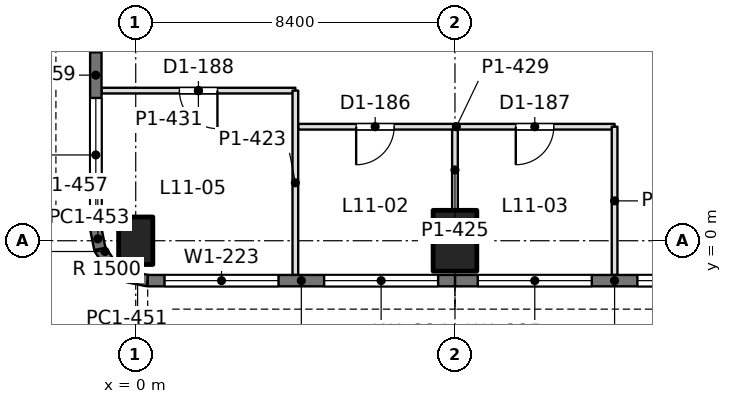
"""IFC4 building model, lengths in metres.
Left out: names, types, materials, properties, quantities, classifications, styles, units other than length and angle.
Written with IfcOpenShell. Run it as: python <this file> out.ifc"""

import sys

from ifc_helpers import new_model, si_unit, direction, frame, frame_2d, origin, origin_with_axes, origin_2d, place, context, subcontext, project, spatial, rectangle, extrude, element, fill, save


model = new_model("IFC4")
c1 = context("Model", 3, precision=1e-05, world=origin(), true_north=direction((0.0, 1.0)))
c2 = subcontext(c1, "Body", "Model", "MODEL_VIEW")
j1 = project(units=[si_unit("LENGTHUNIT", "METRE"), si_unit("PLANEANGLEUNIT", "RADIAN")], contexts=[c1])
p1 = place(None, origin())
s1 = spatial("IfcSite", under=j1, at=p1, CompositionType="ELEMENT")
p2 = place(p1, origin())
s2 = spatial("IfcBuilding", under=s1, at=p2, CompositionType="ELEMENT")
p3 = place(p2, frame((0.0, 0.0, 50.4)))
s3 = spatial("IfcBuildingStorey", under=s2, at=p3, CompositionType="ELEMENT", Elevation=50.4)
p4 = place(p3, origin_with_axes())
e1 = element("IfcColumn", 1, at=p4, inside=s3, PredefinedType="COLUMN", context=c2, shape_type="SweptSolid", body=[
    extrude(rectangle(XDim=0.9, YDim=1.25, at=origin_2d()), origin(), (0.0, 0.0, 1.0), 4.5),
])
p5 = place(p3, frame((8.4, 0.0, 0.0), z_axis=(0.0, 0.0, 1.0), x_axis=(1.0, 0.0, 0.0)))
e2 = element("IfcColumn", 2, at=p5, inside=s3, PredefinedType="COLUMN", context=c2, shape_type="SweptSolid", body=[
    extrude(rectangle(XDim=1.15, YDim=1.6, at=origin_2d()), origin(), (0.0, 0.0, 1.0), 4.5),
])
p6 = place(p3, frame((16.8, -1.05, 0.0), z_axis=(0.0, 0.0, 1.0), x_axis=(-1.0, 0.0, 0.0)))
e3 = element("IfcWall", 3, at=p6, inside=s3, PredefinedType="SOLIDWALL", context=c2, shape_type="SweptSolid", body=[
    extrude(rectangle(XDim=8.4, YDim=0.3, at=frame_2d((4.2, 0.0))), origin(), (0.0, 0.0, 1.0), 4.34),
])
p7 = place(p6, frame((0.6, 0.0, 0.9)))
e4 = element("IfcOpeningElement", 4, at=p7, cuts=e3, PredefinedType="OPENING", context=c2, shape_type="SweptSolid", body=[
    extrude(rectangle(XDim=3.0, YDim=1.9, at=frame_2d((1.5, 0.95))), frame((0.0, 0.16, 0.0), z_axis=(0.0, -1.0, 0.0), x_axis=(1.0, 0.0, 0.0)), (0.0, 0.0, 1.0), 0.32),
])
p8 = place(p6, frame((4.8, 0.0, 0.9)))
e5 = element("IfcOpeningElement", 5, at=p8, cuts=e3, PredefinedType="OPENING", context=c2, shape_type="SweptSolid", body=[
    extrude(rectangle(XDim=3.0, YDim=1.9, at=frame_2d((1.5, 0.95))), frame((0.0, 0.16, 0.0), z_axis=(0.0, -1.0, 0.0), x_axis=(1.0, 0.0, 0.0)), (0.0, 0.0, 1.0), 0.32),
])
p9 = place(p3, frame((8.4, -1.05, 0.0), z_axis=(0.0, 0.0, 1.0), x_axis=(-1.0, 0.0, 0.0)))
e6 = element("IfcWall", 6, at=p9, inside=s3, PredefinedType="SOLIDWALL", context=c2, shape_type="SweptSolid", body=[
    extrude(rectangle(XDim=8.085, YDim=0.3, at=frame_2d((4.042, 0.0))), origin(), (0.0, 0.0, 1.0), 4.34),
])
p10 = place(p9, frame((0.443, 0.0, 0.9)))
e7 = element("IfcOpeningElement", 7, at=p10, cuts=e6, PredefinedType="OPENING", context=c2, shape_type="SweptSolid", body=[
    extrude(rectangle(XDim=3.0, YDim=1.9, at=frame_2d((1.5, 0.95))), frame((0.0, 0.16, 0.0), z_axis=(0.0, -1.0, 0.0), x_axis=(1.0, 0.0, 0.0)), (0.0, 0.0, 1.0), 0.32),
])
p11 = place(p9, frame((4.643, 0.0, 0.9)))
e8 = element("IfcOpeningElement", 8, at=p11, cuts=e6, PredefinedType="OPENING", context=c2, shape_type="SweptSolid", body=[
    extrude(rectangle(XDim=3.0, YDim=1.9, at=frame_2d((1.5, 0.95))), frame((0.0, 0.16, 0.0), z_axis=(0.0, -1.0, 0.0), x_axis=(1.0, 0.0, 0.0)), (0.0, 0.0, 1.0), 0.32),
])
p12 = place(p3, frame((0.315, -1.05, 0.0), z_axis=(0.0, 0.0, 1.0), x_axis=(-0.980788534345, 0.195073962632, 0.0)))
e9 = element("IfcWall", 9, at=p12, inside=s3, PredefinedType="SOLIDWALL", context=c2, shape_type="SweptSolid", body=[
    extrude(rectangle(XDim=0.541, YDim=0.3, at=frame_2d((0.271, 0.0))), origin(), (0.0, 0.0, 1.0), 4.34),
])
for number, where, z_axis, x_axis in (
    (10, (-0.216, -0.945, 0.0), (0.0, 0.0, 1.0), (-0.831, 0.556, 0.0)),
    (11, (-0.653, -0.653, 0.0), (0.0, 0.0, 1.0), (-0.556, 0.831, 0.0)),
):
    element("IfcWall", number, at=place(p3, frame(where, z_axis=z_axis, x_axis=x_axis)), inside=s3, PredefinedType="SOLIDWALL", context=c2, shape_type="SweptSolid", body=[
        extrude(rectangle(XDim=0.526, YDim=0.3, at=frame_2d((0.263, 0.0))), origin(), (0.0, 0.0, 1.0), 4.34),
    ])
p13 = place(p3, frame((-0.945, -0.216, 0.0), z_axis=(0.0, 0.0, 1.0), x_axis=(-0.195073962632, 0.980788534345, 0.0)))
e12 = element("IfcWall", 12, at=p13, inside=s3, PredefinedType="SOLIDWALL", context=c2, shape_type="SweptSolid", body=[
    extrude(rectangle(XDim=0.541, YDim=0.3, at=frame_2d((0.271, 0.0))), origin(), (0.0, 0.0, 1.0), 4.34),
])
p14 = place(p3, frame((-1.05, 0.315, 0.0), z_axis=(0.0, 0.0, 1.0), x_axis=(0.0, 1.0, 0.0)))
e13 = element("IfcWall", 13, at=p14, inside=s3, PredefinedType="SOLIDWALL", context=c2, shape_type="SweptSolid", body=[
    extrude(rectangle(XDim=8.085, YDim=0.3, at=frame_2d((4.042, 0.0))), origin(), (0.0, 0.0, 1.0), 4.34),
])
p15 = place(p14, frame((0.443, 0.0, 0.9)))
e14 = element("IfcOpeningElement", 14, at=p15, cuts=e13, PredefinedType="OPENING", context=c2, shape_type="SweptSolid", body=[
    extrude(rectangle(XDim=3.0, YDim=1.9, at=frame_2d((1.5, 0.95))), frame((0.0, 0.16, 0.0), z_axis=(0.0, -1.0, 0.0), x_axis=(1.0, 0.0, 0.0)), (0.0, 0.0, 1.0), 0.32),
])
p16 = place(p14, frame((4.643, 0.0, 0.9)))
e15 = element("IfcOpeningElement", 15, at=p16, cuts=e13, PredefinedType="OPENING", context=c2, shape_type="SweptSolid", body=[
    extrude(rectangle(XDim=3.0, YDim=1.9, at=frame_2d((1.5, 0.95))), frame((0.0, 0.16, 0.0), z_axis=(0.0, -1.0, 0.0), x_axis=(1.0, 0.0, 0.0)), (0.0, 0.0, 1.0), 0.32),
])
p17 = place(p3, frame((-0.902, 3.95, 0.0), z_axis=(0.0, 0.0, 1.0), x_axis=(1.0, 0.0, 0.0)))
e16 = element("IfcWall", 16, at=p17, inside=s3, PredefinedType="PARTITIONING", context=c2, shape_type="SweptSolid", body=[
    extrude(rectangle(XDim=5.102, YDim=0.15, at=frame_2d((2.551, 0.0))), origin(), (0.0, 0.0, 1.0), 3.84),
])
p18 = place(p17, frame((2.052, 0.0, 0.0)))
e17 = element("IfcOpeningElement", 17, at=p18, cuts=e16, PredefinedType="OPENING", context=c2, shape_type="SweptSolid", body=[
    extrude(rectangle(XDim=1.0, YDim=2.2, at=frame_2d((0.5, 1.1))), frame((0.0, 0.085, 0.0), z_axis=(0.0, -1.0, 0.0), x_axis=(1.0, 0.0, 0.0)), (0.0, 0.0, 1.0), 0.17),
])
p19 = place(p3, frame((4.274, 3.0, 0.0), z_axis=(0.0, 0.0, 1.0), x_axis=(1.0, 0.0, 0.0)))
e18 = element("IfcWall", 18, at=p19, inside=s3, PredefinedType="PARTITIONING", context=c2, shape_type="SweptSolid", body=[
    extrude(rectangle(XDim=8.326, YDim=0.15, at=frame_2d((4.163, 0.0))), origin(), (0.0, 0.0, 1.0), 3.74),
])
p20 = place(p19, frame((1.526, 0.0, 0.0)))
e19 = element("IfcOpeningElement", 19, at=p20, cuts=e18, PredefinedType="OPENING", context=c2, shape_type="SweptSolid", body=[
    extrude(rectangle(XDim=1.0, YDim=2.2, at=frame_2d((0.5, 1.1))), frame((0.0, 0.085, 0.0), z_axis=(0.0, -1.0, 0.0), x_axis=(1.0, 0.0, 0.0)), (0.0, 0.0, 1.0), 0.17),
])
p21 = place(p19, frame((5.726, 0.0, 0.0)))
e20 = element("IfcOpeningElement", 20, at=p21, cuts=e18, PredefinedType="OPENING", context=c2, shape_type="SweptSolid", body=[
    extrude(rectangle(XDim=1.0, YDim=2.2, at=frame_2d((0.5, 1.1))), frame((0.0, 0.085, 0.0), z_axis=(0.0, -1.0, 0.0), x_axis=(1.0, 0.0, 0.0)), (0.0, 0.0, 1.0), 0.17),
])
p22 = place(p3, frame((4.2, -0.902, 0.0), z_axis=(0.0, 0.0, 1.0), x_axis=(0.0, 1.0, 0.0)))
e21 = element("IfcWall", 21, at=p22, inside=s3, PredefinedType="PARTITIONING", context=c2, shape_type="SweptSolid", body=[
    extrude(rectangle(XDim=4.852, YDim=0.15, at=frame_2d((2.426, 0.0))), origin(), (0.0, 0.0, 1.0), 3.84),
])
p23 = place(p3, frame((8.4, 0.799, 0.0), z_axis=(0.0, 0.0, 1.0), x_axis=(0.0, 1.0, 0.0)))
e22 = element("IfcWall", 22, at=p23, inside=s3, PredefinedType="PARTITIONING", context=c2, shape_type="SweptSolid", body=[
    extrude(rectangle(XDim=2.127, YDim=0.15, at=frame_2d((1.063, 0.0))), origin(), (0.0, 0.0, 1.0), 3.74),
])
p24 = place(p3, frame((12.6, -0.902, 0.0), z_axis=(0.0, 0.0, 1.0), x_axis=(0.0, 1.0, 0.0)))
e23 = element("IfcWall", 23, at=p24, inside=s3, PredefinedType="PARTITIONING", context=c2, shape_type="SweptSolid", body=[
    extrude(rectangle(XDim=3.902, YDim=0.15, at=frame_2d((1.951, 0.0))), origin(), (0.0, 0.0, 1.0), 3.84),
])
p25 = place(p7, origin())
e24 = element("IfcWindow", 24, at=p25, inside=s3, PartitioningType="SINGLE_PANEL", PredefinedType="WINDOW", context=c2, shape_type="SweptSolid", body=[
    extrude(rectangle(XDim=3.0, YDim=1.9, at=frame_2d((1.5, 0.95))), frame((0.0, 0.03, 0.0), z_axis=(0.0, -1.0, 0.0), x_axis=(1.0, 0.0, 0.0)), (0.0, 0.0, 1.0), 0.06),
])
fill(e4, e24)
p26 = place(p8, origin())
e25 = element("IfcWindow", 25, at=p26, inside=s3, PartitioningType="SINGLE_PANEL", PredefinedType="WINDOW", context=c2, shape_type="SweptSolid", body=[
    extrude(rectangle(XDim=3.0, YDim=1.9, at=frame_2d((1.5, 0.95))), frame((0.0, 0.03, 0.0), z_axis=(0.0, -1.0, 0.0), x_axis=(1.0, 0.0, 0.0)), (0.0, 0.0, 1.0), 0.06),
])
fill(e5, e25)
p27 = place(p10, origin())
e26 = element("IfcWindow", 26, at=p27, inside=s3, PartitioningType="SINGLE_PANEL", PredefinedType="WINDOW", context=c2, shape_type="SweptSolid", body=[
    extrude(rectangle(XDim=3.0, YDim=1.9, at=frame_2d((1.5, 0.95))), frame((0.0, 0.03, 0.0), z_axis=(0.0, -1.0, 0.0), x_axis=(1.0, 0.0, 0.0)), (0.0, 0.0, 1.0), 0.06),
])
fill(e7, e26)
p28 = place(p11, origin())
e27 = element("IfcWindow", 27, at=p28, inside=s3, PartitioningType="SINGLE_PANEL", PredefinedType="WINDOW", context=c2, shape_type="SweptSolid", body=[
    extrude(rectangle(XDim=3.0, YDim=1.9, at=frame_2d((1.5, 0.95))), frame((0.0, 0.03, 0.0), z_axis=(0.0, -1.0, 0.0), x_axis=(1.0, 0.0, 0.0)), (0.0, 0.0, 1.0), 0.06),
])
fill(e8, e27)
p29 = place(p15, origin())
e28 = element("IfcWindow", 28, at=p29, inside=s3, PartitioningType="SINGLE_PANEL", PredefinedType="WINDOW", context=c2, shape_type="SweptSolid", body=[
    extrude(rectangle(XDim=3.0, YDim=1.9, at=frame_2d((1.5, 0.95))), frame((0.0, 0.03, 0.0), z_axis=(0.0, -1.0, 0.0), x_axis=(1.0, 0.0, 0.0)), (0.0, 0.0, 1.0), 0.06),
])
fill(e14, e28)
p30 = place(p18, frame((1.0, 0.0, 0.0), z_axis=(0.0, 0.0, 1.0), x_axis=(-1.0, 0.0, 0.0)))
e29 = element("IfcDoor", 29, at=p30, inside=s3, OperationType="SINGLE_SWING_LEFT", PredefinedType="DOOR", context=c2, shape_type="SweptSolid", body=[
    extrude(rectangle(XDim=1.0, YDim=2.2, at=frame_2d((0.5, 1.1))), frame((0.0, 0.025, 0.0), z_axis=(0.0, -1.0, 0.0), x_axis=(1.0, 0.0, 0.0)), (0.0, 0.0, 1.0), 0.05),
])
fill(e17, e29)
p31 = place(p20, frame((1.0, 0.0, 0.0), z_axis=(0.0, 0.0, 1.0), x_axis=(-1.0, 0.0, 0.0)))
e30 = element("IfcDoor", 30, at=p31, inside=s3, OperationType="SINGLE_SWING_RIGHT", PredefinedType="DOOR", context=c2, shape_type="SweptSolid", body=[
    extrude(rectangle(XDim=1.0, YDim=2.2, at=frame_2d((0.5, 1.1))), frame((0.0, 0.025, 0.0), z_axis=(0.0, -1.0, 0.0), x_axis=(1.0, 0.0, 0.0)), (0.0, 0.0, 1.0), 0.05),
])
fill(e19, e30)
p32 = place(p21, frame((1.0, 0.0, 0.0), z_axis=(0.0, 0.0, 1.0), x_axis=(-1.0, 0.0, 0.0)))
e31 = element("IfcDoor", 31, at=p32, inside=s3, OperationType="SINGLE_SWING_RIGHT", PredefinedType="DOOR", context=c2, shape_type="SweptSolid", body=[
    extrude(rectangle(XDim=1.0, YDim=2.2, at=frame_2d((0.5, 1.1))), frame((0.0, 0.025, 0.0), z_axis=(0.0, -1.0, 0.0), x_axis=(1.0, 0.0, 0.0)), (0.0, 0.0, 1.0), 0.05),
])
fill(e20, e31)
save(model, sys.argv[1])
